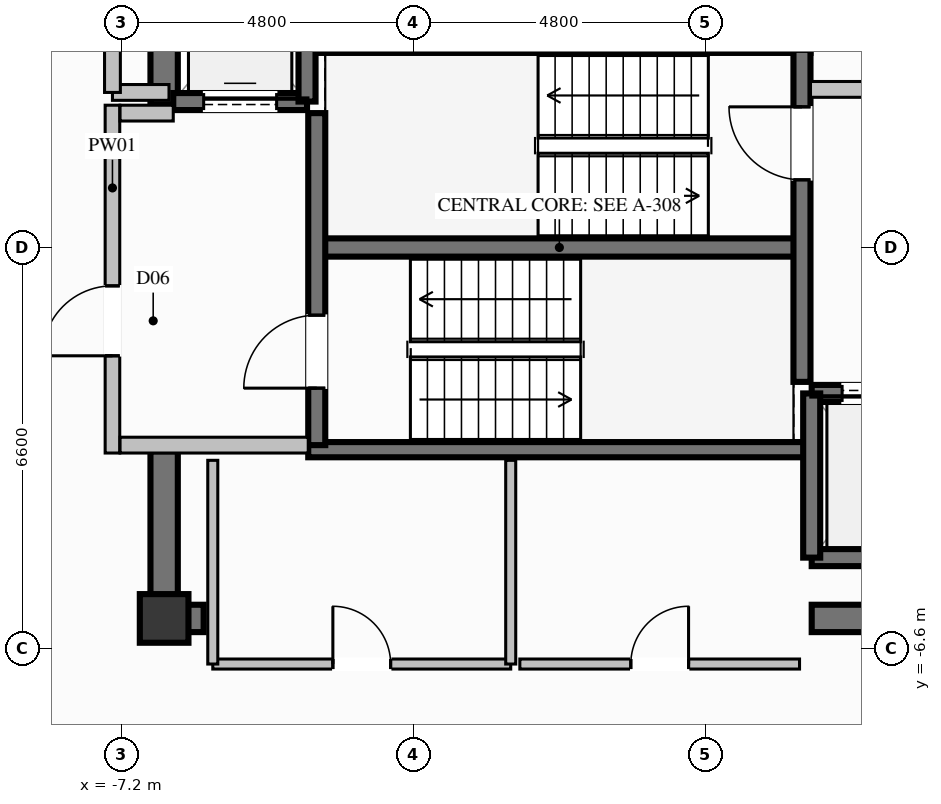
"""IFC4 building model, lengths in metres.
Left out: names, types, materials, properties, quantities, classifications, styles, units other than length and angle.
Written with IfcOpenShell. Run it as: python <this file> out.ifc"""

import sys

from ifc_helpers import new_model, si_unit, direction, frame, frame_2d, origin, origin_2d, place, context, subcontext, project, spatial, rectangle, extrude, element, fill, save


model = new_model("IFC4")
c1 = context("Model", 3, precision=1e-05, world=origin(), true_north=direction((0.0, 1.0)))
c2 = subcontext(c1, "Body", "Model", "MODEL_VIEW")
j1 = project(units=[si_unit("LENGTHUNIT", "METRE"), si_unit("PLANEANGLEUNIT", "RADIAN")], contexts=[c1])
p1 = place(None, origin())
s1 = spatial("IfcSite", under=j1, at=p1, CompositionType="ELEMENT")
p2 = place(p1, origin())
s2 = spatial("IfcBuilding", under=s1, at=p2, CompositionType="ELEMENT")
p3 = place(p2, frame((0.0, 0.0, 243.0)))
s3 = spatial("IfcBuildingStorey", under=s2, at=p3, CompositionType="ELEMENT", Elevation=243.0)
p4 = place(p3, frame((-6.5, -6.1, 0.0), z_axis=(0.0, 0.0, 1.0), x_axis=(1.0, 0.0, 0.0)))
e1 = element("IfcColumn", 1, at=p4, inside=s3, PredefinedType="COLUMN", context=c2, shape_type="SweptSolid", body=[
    extrude(rectangle(XDim=0.8, YDim=0.8, at=origin_2d()), origin(), (0.0, 0.0, 1.0), 3.8),
])
p5 = place(p3, frame((-3.99, 0.0, 0.0), z_axis=(0.0, 0.0, 1.0), x_axis=(1.0, 0.0, 0.0)))
e2 = element("IfcWall", 2, at=p5, inside=s3, PredefinedType="SHEAR", context=c2, shape_type="SweptSolid", body=[
    extrude(rectangle(XDim=7.98, YDim=0.3, at=frame_2d((3.99, 0.0))), origin(), (0.0, 0.0, 1.0), 3.8),
])
for number, where, z_axis, x_axis in (
    (3, (-4.13, -3.325, 0.0), (0.0, 0.0, 1.0), (1.0, 0.0, 0.0)),
    (4, (-4.13, 3.325, 0.0), (0.0, 0.0, 1.0), (1.0, 0.0, 0.0)),
):
    element("IfcWall", number, at=place(p3, frame(where, z_axis=z_axis, x_axis=x_axis)), inside=s3, PredefinedType="SOLIDWALL", context=c2, shape_type="SweptSolid", body=[
        extrude(rectangle(XDim=8.26, YDim=0.25, at=frame_2d((4.13, 0.0))), origin(), (0.0, 0.0, 1.0), 3.8),
    ])
p6 = place(p3, frame((-6.275, -6.1, 0.0), z_axis=(0.0, 0.0, 1.0), x_axis=(1.0, 0.0, 0.0)))
e5 = element("IfcWall", 5, at=p6, inside=s3, PredefinedType="SHEAR", context=c2, shape_type="SweptSolid", body=[
    extrude(rectangle(XDim=0.425, YDim=0.45, at=frame_2d((0.212, 0.0))), origin(), (0.0, 0.0, 1.0), 3.8),
])
p7 = place(p3, frame((4.15, -6.1, 0.0), z_axis=(0.0, 0.0, 1.0), x_axis=(1.0, 0.0, 0.0)))
e6 = element("IfcWall", 6, at=p7, inside=s3, PredefinedType="SHEAR", context=c2, shape_type="SweptSolid", body=[
    extrude(rectangle(XDim=2.125, YDim=0.45, at=frame_2d((1.062, 0.0))), origin(), (0.0, 0.0, 1.0), 3.8),
])
p8 = place(p3, frame((-6.5, 2.35, 0.0), z_axis=(0.0, 0.0, 1.0), x_axis=(0.0, 1.0, 0.0)))
e7 = element("IfcWall", 7, at=p8, inside=s3, PredefinedType="SHEAR", context=c2, shape_type="SweptSolid", body=[
    extrude(rectangle(XDim=3.975, YDim=0.45, at=frame_2d((1.987, 0.0))), origin(), (0.0, 0.0, 1.0), 3.8),
])
p9 = place(p3, frame((-6.5, -6.325, 0.0), z_axis=(0.0, 0.0, 1.0), x_axis=(0.0, 1.0, 0.0)))
e8 = element("IfcWall", 8, at=p9, inside=s3, PredefinedType="SHEAR", context=c2, shape_type="SweptSolid", body=[
    extrude(rectangle(XDim=2.975, YDim=0.45, at=frame_2d((1.487, 0.0))), origin(), (0.0, 0.0, 1.0), 3.8),
])
p10 = place(p3, frame((-6.35, 2.4, 0.0), z_axis=(0.0, 0.0, 1.0), x_axis=(1.0, 0.0, 0.0)))
e9 = element("IfcWall", 9, at=p10, inside=s3, PredefinedType="SOLIDWALL", context=c2, shape_type="SweptSolid", body=[
    extrude(rectangle(XDim=2.2, YDim=0.28, at=frame_2d((1.1, 0.0))), origin(), (0.0, 0.0, 1.0), 3.57),
])
p11 = place(p10, frame((0.5, 0.0, 0.0)))
e10 = element("IfcOpeningElement", 10, at=p11, cuts=e9, PredefinedType="OPENING", context=c2, shape_type="SweptSolid", body=[
    extrude(rectangle(XDim=1.2, YDim=2.2, at=frame_2d((0.6, 1.1))), frame((0.0, 0.15, 0.0), z_axis=(0.0, -1.0, 0.0), x_axis=(1.0, 0.0, 0.0)), (0.0, 0.0, 1.0), 0.3),
])
p12 = place(p3, frame((-4.15, 2.4, 0.0), z_axis=(0.0, 0.0, 1.0), x_axis=(0.0, 1.0, 0.0)))
e11 = element("IfcWall", 11, at=p12, inside=s3, PredefinedType="SOLIDWALL", context=c2, shape_type="SweptSolid", body=[
    extrude(rectangle(XDim=2.7, YDim=0.28, at=frame_2d((1.35, 0.0))), origin(), (0.0, 0.0, 1.0), 3.57),
])
p13 = place(p3, frame((4.15, -5.1, 0.0), z_axis=(0.0, 0.0, 1.0), x_axis=(1.0, 0.0, 0.0)))
e12 = element("IfcWall", 12, at=p13, inside=s3, PredefinedType="SOLIDWALL", context=c2, shape_type="SweptSolid", body=[
    extrude(rectangle(XDim=2.2, YDim=0.28, at=frame_2d((1.1, 0.0))), origin(), (0.0, 0.0, 1.0), 3.57),
])
p14 = place(p3, frame((6.35, -2.4, 0.0), z_axis=(0.0, 0.0, 1.0), x_axis=(-1.0, 0.0, 0.0)))
e13 = element("IfcWall", 13, at=p14, inside=s3, PredefinedType="SOLIDWALL", context=c2, shape_type="SweptSolid", body=[
    extrude(rectangle(XDim=2.2, YDim=0.28, at=frame_2d((1.1, 0.0))), origin(), (0.0, 0.0, 1.0), 3.57),
])
p15 = place(p14, frame((0.5, 0.0, 0.0)))
e14 = element("IfcOpeningElement", 14, at=p15, cuts=e13, PredefinedType="OPENING", context=c2, shape_type="SweptSolid", body=[
    extrude(rectangle(XDim=1.2, YDim=2.2, at=frame_2d((0.6, 1.1))), frame((0.0, 0.15, 0.0), z_axis=(0.0, -1.0, 0.0), x_axis=(1.0, 0.0, 0.0)), (0.0, 0.0, 1.0), 0.3),
])
p16 = place(p3, frame((4.15, -2.4, 0.0), z_axis=(0.0, 0.0, 1.0), x_axis=(0.0, -1.0, 0.0)))
e15 = element("IfcWall", 15, at=p16, inside=s3, PredefinedType="SOLIDWALL", context=c2, shape_type="SweptSolid", body=[
    extrude(rectangle(XDim=2.7, YDim=0.28, at=frame_2d((1.35, 0.0))), origin(), (0.0, 0.0, 1.0), 3.57),
])
p17 = place(p3, frame((-3.99, -3.25, 0.0), z_axis=(0.0, 0.0, 1.0), x_axis=(0.0, 1.0, 0.0)))
e16 = element("IfcWall", 16, at=p17, inside=s3, PredefinedType="SOLIDWALL", context=c2, shape_type="SweptSolid", body=[
    extrude(rectangle(XDim=5.46, YDim=0.28, at=frame_2d((2.73, 0.0))), origin(), (0.0, 0.0, 1.0), 3.57),
])
p18 = place(p17, frame((0.937, 0.0, 0.0)))
e17 = element("IfcOpeningElement", 17, at=p18, cuts=e16, PredefinedType="OPENING", context=c2, shape_type="SweptSolid", body=[
    extrude(rectangle(XDim=1.2, YDim=2.2, at=frame_2d((0.6, 1.1))), frame((0.0, 0.15, 0.0), z_axis=(0.0, -1.0, 0.0), x_axis=(1.0, 0.0, 0.0)), (0.0, 0.0, 1.0), 0.3),
])
p19 = place(p3, frame((3.99, -2.21, 0.0), z_axis=(0.0, 0.0, 1.0), x_axis=(0.0, 1.0, 0.0)))
e18 = element("IfcWall", 18, at=p19, inside=s3, PredefinedType="SOLIDWALL", context=c2, shape_type="SweptSolid", body=[
    extrude(rectangle(XDim=5.46, YDim=0.28, at=frame_2d((2.73, 0.0))), origin(), (0.0, 0.0, 1.0), 3.57),
])
p20 = place(p19, frame((3.323, 0.0, 0.0)))
e19 = element("IfcOpeningElement", 19, at=p20, cuts=e18, PredefinedType="OPENING", context=c2, shape_type="SweptSolid", body=[
    extrude(rectangle(XDim=1.2, YDim=2.2, at=frame_2d((0.6, 1.1))), frame((0.0, 0.15, 0.0), z_axis=(0.0, -1.0, 0.0), x_axis=(1.0, 0.0, 0.0)), (0.0, 0.0, 1.0), 0.3),
])
p21 = place(p3, frame((-7.35, -3.38, 0.0), z_axis=(0.0, 0.0, 1.0), x_axis=(0.0, 1.0, 0.0)))
e20 = element("IfcWall", 20, at=p21, inside=s3, PredefinedType="PARTITIONING", context=c2, shape_type="SweptSolid", body=[
    extrude(rectangle(XDim=5.72, YDim=0.24, at=frame_2d((2.86, 0.0))), origin(), (0.0, 0.0, 1.0), 2.655),
])
p22 = place(p21, frame((1.599, 0.0, 0.0)))
e21 = element("IfcOpeningElement", 21, at=p22, cuts=e20, PredefinedType="OPENING", context=c2, shape_type="SweptSolid", body=[
    extrude(rectangle(XDim=1.15, YDim=2.2, at=frame_2d((0.575, 1.1))), frame((0.0, 0.13, 0.0), z_axis=(0.0, -1.0, 0.0), x_axis=(1.0, 0.0, 0.0)), (0.0, 0.0, 1.0), 0.26),
])
p23 = place(p3, frame((-7.225, -3.25, 0.0), z_axis=(0.0, 0.0, 1.0), x_axis=(1.0, 0.0, 0.0)))
e22 = element("IfcWall", 22, at=p23, inside=s3, PredefinedType="PARTITIONING", context=c2, shape_type="SweptSolid", body=[
    extrude(rectangle(XDim=3.095, YDim=0.26, at=frame_2d((1.548, 0.0))), origin(), (0.0, 0.0, 1.0), 3.57),
])
p24 = place(p3, frame((-7.225, 2.21, 0.0), z_axis=(0.0, 0.0, 1.0), x_axis=(1.0, 0.0, 0.0)))
e23 = element("IfcWall", 23, at=p24, inside=s3, PredefinedType="PARTITIONING", context=c2, shape_type="SweptSolid", body=[
    extrude(rectangle(XDim=0.875, YDim=0.26, at=frame_2d((0.438, 0.0))), origin(), (0.0, 0.0, 1.0), 3.57),
])
p25 = place(p3, frame((4.13, 2.6, 0.0), z_axis=(0.0, 0.0, 1.0), x_axis=(1.0, 0.0, 0.0)))
e24 = element("IfcWall", 24, at=p25, inside=s3, PredefinedType="PARTITIONING", context=c2, shape_type="SweptSolid", body=[
    extrude(rectangle(XDim=3.095, YDim=0.26, at=frame_2d((1.548, 0.0))), origin(), (0.0, 0.0, 1.0), 3.57),
])
p26 = place(p3, frame((-7.35, 2.55, 0.0), z_axis=(0.0, 0.0, 1.0), x_axis=(1.0, 0.0, 0.0)))
e25 = element("IfcWall", 25, at=p26, inside=s3, PredefinedType="PARTITIONING", context=c2, shape_type="SweptSolid", body=[
    extrude(rectangle(XDim=0.93, YDim=0.26, at=frame_2d((0.465, 0.0))), origin(), (0.0, 0.0, 1.0), 3.57),
])
p27 = place(p3, frame((-7.35, 2.55, 0.0), z_axis=(0.0, 0.0, 1.0), x_axis=(0.0, 1.0, 0.0)))
e26 = element("IfcWall", 26, at=p27, inside=s3, PredefinedType="PARTITIONING", context=c2, shape_type="SweptSolid", body=[
    extrude(rectangle(XDim=2.4, YDim=0.26, at=frame_2d((1.2, 0.0))), origin(), (0.0, 0.0, 1.0), 2.655),
])
p28 = place(p27, frame((0.775, 0.0, 0.0)))
e27 = element("IfcOpeningElement", 27, at=p28, cuts=e26, PredefinedType="OPENING", context=c2, shape_type="SweptSolid", body=[
    extrude(rectangle(XDim=0.85, YDim=2.05, at=frame_2d((0.425, 1.025))), frame((0.0, 0.14, 0.0), z_axis=(0.0, -1.0, 0.0), x_axis=(1.0, 0.0, 0.0)), (0.0, 0.0, 1.0), 0.28),
])
p29 = place(p3, frame((-5.7, -6.85, 0.0), z_axis=(0.0, 0.0, 1.0), x_axis=(1.0, 0.0, 0.0)))
e28 = element("IfcWall", 28, at=p29, inside=s3, PredefinedType="PARTITIONING", context=c2, shape_type="SweptSolid", body=[
    extrude(rectangle(XDim=4.9, YDim=0.165, at=frame_2d((2.45, 0.0))), origin(), (0.0, 0.0, 1.0), 2.655),
])
p30 = place(p29, frame((1.975, 0.0, 0.0)))
e29 = element("IfcOpeningElement", 29, at=p30, cuts=e28, PredefinedType="OPENING", context=c2, shape_type="SweptSolid", body=[
    extrude(rectangle(XDim=0.95, YDim=2.1, at=frame_2d((0.475, 1.05))), frame((0.0, 0.093, 0.0), z_axis=(0.0, -1.0, 0.0), x_axis=(1.0, 0.0, 0.0)), (0.0, 0.0, 1.0), 0.185),
])
p31 = place(p3, frame((-0.8, -6.85, 0.0), z_axis=(0.0, 0.0, 1.0), x_axis=(0.0, 1.0, 0.0)))
e30 = element("IfcWall", 30, at=p31, inside=s3, PredefinedType="PARTITIONING", context=c2, shape_type="SweptSolid", body=[
    extrude(rectangle(XDim=3.35, YDim=0.165, at=frame_2d((1.675, 0.0))), origin(), (0.0, 0.0, 1.0), 3.57),
])
p32 = place(p3, frame((-5.7, -3.5, 0.0), z_axis=(0.0, 0.0, 1.0), x_axis=(0.0, -1.0, 0.0)))
e31 = element("IfcWall", 31, at=p32, inside=s3, PredefinedType="PARTITIONING", context=c2, shape_type="SweptSolid", body=[
    extrude(rectangle(XDim=3.35, YDim=0.165, at=frame_2d((1.675, 0.0))), origin(), (0.0, 0.0, 1.0), 2.655),
])
p33 = place(p3, frame((-0.65, -6.85, 0.0), z_axis=(0.0, 0.0, 1.0), x_axis=(1.0, 0.0, 0.0)))
e32 = element("IfcWall", 32, at=p33, inside=s3, PredefinedType="PARTITIONING", context=c2, shape_type="SweptSolid", body=[
    extrude(rectangle(XDim=4.6, YDim=0.165, at=frame_2d((2.3, 0.0))), origin(), (0.0, 0.0, 1.0), 2.655),
])
p34 = place(p33, frame((1.825, 0.0, 0.0)))
e33 = element("IfcOpeningElement", 33, at=p34, cuts=e32, PredefinedType="OPENING", context=c2, shape_type="SweptSolid", body=[
    extrude(rectangle(XDim=0.95, YDim=2.1, at=frame_2d((0.475, 1.05))), frame((0.0, 0.093, 0.0), z_axis=(0.0, -1.0, 0.0), x_axis=(1.0, 0.0, 0.0)), (0.0, 0.0, 1.0), 0.185),
])
p35 = place(p11, origin())
e34 = element("IfcDoor", 34, at=p35, inside=s3, OperationType="SLIDING_TO_LEFT", PredefinedType="DOOR", context=c2, shape_type="SweptSolid", body=[
    extrude(rectangle(XDim=1.2, YDim=2.2, at=frame_2d((0.6, 1.1))), frame((0.0, 0.025, 0.0), z_axis=(0.0, -1.0, 0.0), x_axis=(1.0, 0.0, 0.0)), (0.0, 0.0, 1.0), 0.05),
])
fill(e10, e34)
p36 = place(p15, origin())
e35 = element("IfcDoor", 35, at=p36, inside=s3, OperationType="SLIDING_TO_LEFT", PredefinedType="DOOR", context=c2, shape_type="SweptSolid", body=[
    extrude(rectangle(XDim=1.2, YDim=2.2, at=frame_2d((0.6, 1.1))), frame((0.0, 0.025, 0.0), z_axis=(0.0, -1.0, 0.0), x_axis=(1.0, 0.0, 0.0)), (0.0, 0.0, 1.0), 0.05),
])
fill(e14, e35)
p37 = place(p18, origin())
e36 = element("IfcDoor", 36, at=p37, inside=s3, OperationType="SINGLE_SWING_LEFT", PredefinedType="DOOR", context=c2, shape_type="SweptSolid", body=[
    extrude(rectangle(XDim=1.2, YDim=2.2, at=frame_2d((0.6, 1.1))), frame((0.0, 0.025, 0.0), z_axis=(0.0, -1.0, 0.0), x_axis=(1.0, 0.0, 0.0)), (0.0, 0.0, 1.0), 0.05),
])
fill(e17, e36)
p38 = place(p20, origin())
e37 = element("IfcDoor", 37, at=p38, inside=s3, OperationType="SINGLE_SWING_RIGHT", PredefinedType="DOOR", context=c2, shape_type="SweptSolid", body=[
    extrude(rectangle(XDim=1.2, YDim=2.2, at=frame_2d((0.6, 1.1))), frame((0.0, 0.025, 0.0), z_axis=(0.0, -1.0, 0.0), x_axis=(1.0, 0.0, 0.0)), (0.0, 0.0, 1.0), 0.05),
])
fill(e19, e37)
p39 = place(p22, origin())
e38 = element("IfcDoor", 38, at=p39, inside=s3, OperationType="SINGLE_SWING_LEFT", PredefinedType="DOOR", context=c2, shape_type="SweptSolid", body=[
    extrude(rectangle(XDim=1.15, YDim=2.2, at=frame_2d((0.575, 1.1))), frame((0.0, 0.025, 0.0), z_axis=(0.0, -1.0, 0.0), x_axis=(1.0, 0.0, 0.0)), (0.0, 0.0, 1.0), 0.05),
])
fill(e21, e38)
p40 = place(p30, origin())
e39 = element("IfcDoor", 39, at=p40, inside=s3, OperationType="SINGLE_SWING_LEFT", PredefinedType="DOOR", context=c2, shape_type="SweptSolid", body=[
    extrude(rectangle(XDim=0.95, YDim=2.1, at=frame_2d((0.475, 1.05))), frame((0.0, 0.025, 0.0), z_axis=(0.0, -1.0, 0.0), x_axis=(1.0, 0.0, 0.0)), (0.0, 0.0, 1.0), 0.05),
])
fill(e29, e39)
p41 = place(p34, origin())
e40 = element("IfcDoor", 40, at=p41, inside=s3, OperationType="SINGLE_SWING_RIGHT", PredefinedType="DOOR", context=c2, shape_type="SweptSolid", body=[
    extrude(rectangle(XDim=0.95, YDim=2.1, at=frame_2d((0.475, 1.05))), frame((0.0, 0.025, 0.0), z_axis=(0.0, -1.0, 0.0), x_axis=(1.0, 0.0, 0.0)), (0.0, 0.0, 1.0), 0.05),
])
fill(e33, e40)
save(model, sys.argv[1])
